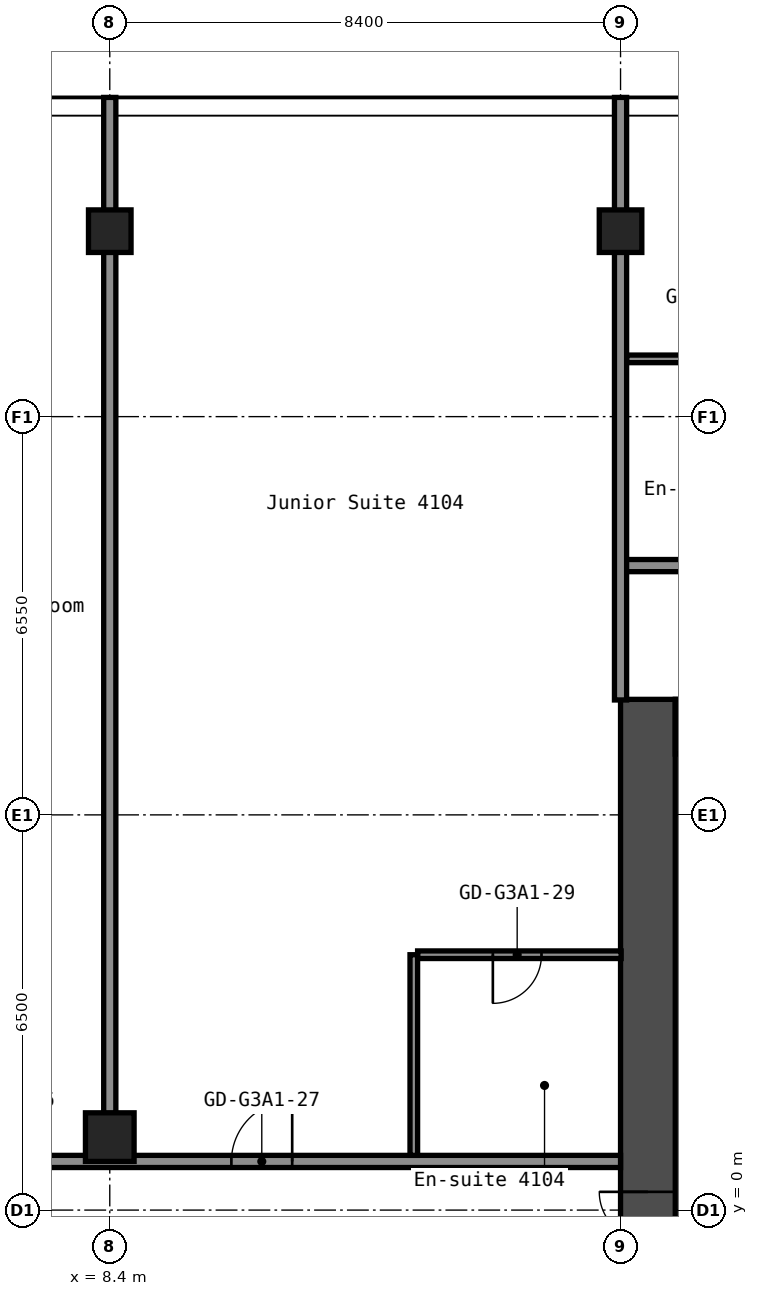
"""IFC4 building model, lengths in metres.
Left out: names, types, materials, properties, quantities, classifications, styles, units other than length and angle.
Written with IfcOpenShell. Run it as: python <this file> out.ifc"""

import sys

from ifc_helpers import new_model, si_unit, direction, frame, frame_2d, origin, origin_2d, place, context, subcontext, project, spatial, rectangle, hollow_rectangle, extrude, element, fill, save


model = new_model("IFC4")
c1 = context("Model", 3, precision=1e-05, world=origin(), true_north=direction((0.0, 1.0)))
c2 = subcontext(c1, "Body", "Model", "MODEL_VIEW")
j1 = project(units=[si_unit("LENGTHUNIT", "METRE"), si_unit("PLANEANGLEUNIT", "RADIAN")], contexts=[c1])
p1 = place(None, origin())
s1 = spatial("IfcSite", under=j1, at=p1, CompositionType="ELEMENT")
p2 = place(p1, origin())
s2 = spatial("IfcBuilding", under=s1, at=p2, CompositionType="ELEMENT")
p3 = place(p2, frame((0.0, 0.0, 147.0)))
s3 = spatial("IfcBuildingStorey", under=s2, at=p3, CompositionType="ELEMENT", Elevation=147.0)
p4 = place(p3, frame((8.4, 1.2, 0.0), z_axis=(0.0, 0.0, 1.0), x_axis=(1.0, 0.0, 0.0)))
e1 = element("IfcColumn", 1, at=p4, inside=s3, PredefinedType="COLUMN", context=c2, shape_type="SweptSolid", body=[
    extrude(hollow_rectangle(XDim=0.8, YDim=0.8, WallThickness=0.032, at=origin_2d()), origin(), (0.0, 0.0, 1.0), 2.75),
])
for number, where, z_axis, x_axis in (
    (2, (8.4, 16.1, 0.0), (0.0, 0.0, 1.0), (1.0, 0.0, 0.0)),
    (3, (16.8, 16.1, 0.0), (0.0, 0.0, 1.0), (1.0, 0.0, 0.0)),
):
    element("IfcColumn", number, at=place(p3, frame(where, z_axis=z_axis, x_axis=x_axis)), inside=s3, PredefinedType="COLUMN", context=c2, shape_type="SweptSolid", body=[
        extrude(hollow_rectangle(XDim=0.7, YDim=0.7, WallThickness=0.028, at=origin_2d()), origin(), (0.0, 0.0, 1.0), 2.75),
    ])
p5 = place(p3, frame((17.25, -8.4, 0.0), z_axis=(0.0, 0.0, 1.0), x_axis=(0.0, 1.0, 0.0)))
e4 = element("IfcWall", 4, at=p5, inside=s3, PredefinedType="SHEAR", context=c2, shape_type="SweptSolid", body=[
    extrude(rectangle(XDim=16.8, YDim=0.9, at=frame_2d((8.4, 0.0))), origin(), (0.0, 0.0, 1.0), 2.75),
])
p6 = place(p5, frame((7.1, 0.0, 0.0)))
e5 = element("IfcOpeningElement", 5, at=p6, cuts=e4, PredefinedType="OPENING", context=c2, shape_type="SweptSolid", body=[
    extrude(rectangle(XDim=1.6, YDim=2.1, at=frame_2d((0.8, 1.05))), frame((0.0, 0.46, 0.0), z_axis=(0.0, -1.0, 0.0), x_axis=(1.0, 0.0, 0.0)), (0.0, 0.0, 1.0), 0.92),
])
p7 = place(p3, frame((17.7, 7.95, 0.0), z_axis=(0.0, 0.0, 1.0), x_axis=(1.0, 0.0, 0.0)))
e6 = element("IfcWall", 6, at=p7, inside=s3, PredefinedType="SHEAR", context=c2, shape_type="SweptSolid", body=[
    extrude(rectangle(XDim=15.0, YDim=0.9, at=frame_2d((7.5, 0.0))), origin(), (0.0, 0.0, 1.0), 2.75),
])
p8 = place(p7, frame((10.4, 0.0, 0.0)))
e7 = element("IfcOpeningElement", 7, at=p8, cuts=e6, PredefinedType="OPENING", context=c2, shape_type="SweptSolid", body=[
    extrude(rectangle(XDim=1.2, YDim=2.1, at=frame_2d((0.6, 1.05))), frame((0.0, 0.46, 0.0), z_axis=(0.0, -1.0, 0.0), x_axis=(1.0, 0.0, 0.0)), (0.0, 0.0, 1.0), 0.92),
])
p9 = place(p7, frame((13.35, 0.0, 0.0)))
e8 = element("IfcOpeningElement", 8, at=p9, cuts=e6, PredefinedType="OPENING", context=c2, shape_type="SweptSolid", body=[
    extrude(rectangle(XDim=0.9, YDim=2.1, at=frame_2d((0.45, 1.05))), frame((0.0, 0.46, 0.0), z_axis=(0.0, -1.0, 0.0), x_axis=(1.0, 0.0, 0.0)), (0.0, 0.0, 1.0), 0.92),
])
p10 = place(p3, frame((-16.8, 0.8, 0.0), z_axis=(0.0, 0.0, 1.0), x_axis=(1.0, 0.0, 0.0)))
e9 = element("IfcWall", 9, at=p10, inside=s3, PredefinedType="PARTITIONING", context=c2, shape_type="SweptSolid", body=[
    extrude(rectangle(XDim=33.6, YDim=0.2, at=frame_2d((16.8, 0.0))), origin(), (0.0, 0.0, 1.0), 2.75),
])
p11 = place(p10, frame((2.0, 0.0, 0.0)))
e10 = element("IfcOpeningElement", 10, at=p11, cuts=e9, PredefinedType="OPENING", context=c2, shape_type="SweptSolid", body=[
    extrude(rectangle(XDim=1.0, YDim=2.1, at=frame_2d((0.5, 1.05))), frame((0.0, 0.11, 0.0), z_axis=(0.0, -1.0, 0.0), x_axis=(1.0, 0.0, 0.0)), (0.0, 0.0, 1.0), 0.22),
])
p12 = place(p10, frame((12.1, 0.0, 0.0)))
e11 = element("IfcOpeningElement", 11, at=p12, cuts=e9, PredefinedType="OPENING", context=c2, shape_type="SweptSolid", body=[
    extrude(rectangle(XDim=1.0, YDim=2.1, at=frame_2d((0.5, 1.05))), frame((0.0, 0.11, 0.0), z_axis=(0.0, -1.0, 0.0), x_axis=(1.0, 0.0, 0.0)), (0.0, 0.0, 1.0), 0.22),
])
p13 = place(p10, frame((18.7, 0.0, 0.0)))
e12 = element("IfcOpeningElement", 12, at=p13, cuts=e9, PredefinedType="OPENING", context=c2, shape_type="SweptSolid", body=[
    extrude(rectangle(XDim=0.9, YDim=2.1, at=frame_2d((0.45, 1.05))), frame((0.0, 0.11, 0.0), z_axis=(0.0, -1.0, 0.0), x_axis=(1.0, 0.0, 0.0)), (0.0, 0.0, 1.0), 0.22),
])
p14 = place(p10, frame((22.9, 0.0, 0.0)))
e13 = element("IfcOpeningElement", 13, at=p14, cuts=e9, PredefinedType="OPENING", context=c2, shape_type="SweptSolid", body=[
    extrude(rectangle(XDim=0.9, YDim=2.1, at=frame_2d((0.45, 1.05))), frame((0.0, 0.11, 0.0), z_axis=(0.0, -1.0, 0.0), x_axis=(1.0, 0.0, 0.0)), (0.0, 0.0, 1.0), 0.22),
])
p15 = place(p10, frame((27.2, 0.0, 0.0)))
e14 = element("IfcOpeningElement", 14, at=p15, cuts=e9, PredefinedType="OPENING", context=c2, shape_type="SweptSolid", body=[
    extrude(rectangle(XDim=1.0, YDim=2.1, at=frame_2d((0.5, 1.05))), frame((0.0, 0.11, 0.0), z_axis=(0.0, -1.0, 0.0), x_axis=(1.0, 0.0, 0.0)), (0.0, 0.0, 1.0), 0.22),
])
p16 = place(p3, frame((13.462, 4.2, 0.0), z_axis=(0.0, 0.0, 1.0), x_axis=(1.0, 0.0, 0.0)))
e15 = element("IfcWall", 15, at=p16, inside=s3, PredefinedType="PARTITIONING", context=c2, shape_type="SweptSolid", body=[
    extrude(rectangle(XDim=3.348, YDim=0.125, at=frame_2d((1.674, 0.0))), origin(), (0.0, 0.0, 1.0), 2.75),
])
p17 = place(p16, frame((1.238, 0.0, 0.0)))
e16 = element("IfcOpeningElement", 16, at=p17, cuts=e15, PredefinedType="OPENING", context=c2, shape_type="SweptSolid", body=[
    extrude(rectangle(XDim=0.8, YDim=2.1, at=frame_2d((0.4, 1.05))), frame((0.0, 0.073, 0.0), z_axis=(0.0, -1.0, 0.0), x_axis=(1.0, 0.0, 0.0)), (0.0, 0.0, 1.0), 0.145),
])
p18 = place(p3, frame((16.8, 10.6, 0.0), z_axis=(0.0, 0.0, 1.0), x_axis=(1.0, 0.0, 0.0)))
e17 = element("IfcWall", 17, at=p18, inside=s3, PredefinedType="PARTITIONING", context=c2, shape_type="SweptSolid", body=[
    extrude(rectangle(XDim=25.9, YDim=0.2, at=frame_2d((12.95, 0.0))), origin(), (0.0, 0.0, 1.0), 2.75),
])
p19 = place(p18, frame((5.4, 0.0, 0.0)))
e18 = element("IfcOpeningElement", 18, at=p19, cuts=e17, PredefinedType="OPENING", context=c2, shape_type="SweptSolid", body=[
    extrude(rectangle(XDim=1.0, YDim=2.1, at=frame_2d((0.5, 1.05))), frame((0.0, 0.11, 0.0), z_axis=(0.0, -1.0, 0.0), x_axis=(1.0, 0.0, 0.0)), (0.0, 0.0, 1.0), 0.22),
])
p20 = place(p18, frame((13.8, 0.0, 0.0)))
e19 = element("IfcOpeningElement", 19, at=p20, cuts=e17, PredefinedType="OPENING", context=c2, shape_type="SweptSolid", body=[
    extrude(rectangle(XDim=1.0, YDim=2.1, at=frame_2d((0.5, 1.05))), frame((0.0, 0.11, 0.0), z_axis=(0.0, -1.0, 0.0), x_axis=(1.0, 0.0, 0.0)), (0.0, 0.0, 1.0), 0.22),
])
p21 = place(p18, frame((19.0, 0.0, 0.0)))
e20 = element("IfcOpeningElement", 20, at=p21, cuts=e17, PredefinedType="OPENING", context=c2, shape_type="SweptSolid", body=[
    extrude(rectangle(XDim=1.0, YDim=2.1, at=frame_2d((0.5, 1.05))), frame((0.0, 0.11, 0.0), z_axis=(0.0, -1.0, 0.0), x_axis=(1.0, 0.0, 0.0)), (0.0, 0.0, 1.0), 0.22),
])
p22 = place(p3, frame((16.9, 14.0, 0.0), z_axis=(0.0, 0.0, 1.0), x_axis=(1.0, 0.0, 0.0)))
e21 = element("IfcWall", 21, at=p22, inside=s3, PredefinedType="PARTITIONING", context=c2, shape_type="SweptSolid", body=[
    extrude(rectangle(XDim=3.238, YDim=0.125, at=frame_2d((1.619, 0.0))), origin(), (0.0, 0.0, 1.0), 2.75),
])
p23 = place(p22, frame((1.2, 0.0, 0.0)))
e22 = element("IfcOpeningElement", 22, at=p23, cuts=e21, PredefinedType="OPENING", context=c2, shape_type="SweptSolid", body=[
    extrude(rectangle(XDim=0.8, YDim=2.1, at=frame_2d((0.4, 1.05))), frame((0.0, 0.073, 0.0), z_axis=(0.0, -1.0, 0.0), x_axis=(1.0, 0.0, 0.0)), (0.0, 0.0, 1.0), 0.145),
])
p24 = place(p3, frame((8.4, 1.59, 0.0), z_axis=(0.0, 0.0, 1.0), x_axis=(0.0, 1.0, 0.0)))
e23 = element("IfcWall", 23, at=p24, inside=s3, PredefinedType="PARTITIONING", context=c2, shape_type="SweptSolid", body=[
    extrude(rectangle(XDim=16.71, YDim=0.2, at=frame_2d((8.355, 0.0))), origin(), (0.0, 0.0, 1.0), 2.75),
])
p25 = place(p3, frame((13.4, 0.9, 0.0), z_axis=(0.0, 0.0, 1.0), x_axis=(0.0, 1.0, 0.0)))
e24 = element("IfcWall", 24, at=p25, inside=s3, PredefinedType="PARTITIONING", context=c2, shape_type="SweptSolid", body=[
    extrude(rectangle(XDim=3.3, YDim=0.125, at=frame_2d((1.65, 0.0))), origin(), (0.0, 0.0, 1.0), 2.75),
])
p26 = place(p3, frame((16.8, 8.39, 0.0), z_axis=(0.0, 0.0, 1.0), x_axis=(0.0, 1.0, 0.0)))
e25 = element("IfcWall", 25, at=p26, inside=s3, PredefinedType="PARTITIONING", context=c2, shape_type="SweptSolid", body=[
    extrude(rectangle(XDim=9.91, YDim=0.2, at=frame_2d((4.955, 0.0))), origin(), (0.0, 0.0, 1.0), 2.75),
])
p27 = place(p6, origin())
e26 = element("IfcDoor", 26, at=p27, inside=s3, OperationType="DOUBLE_DOOR_SINGLE_SWING", PredefinedType="DOOR", context=c2, shape_type="SweptSolid", body=[
    extrude(rectangle(XDim=1.6, YDim=2.1, at=frame_2d((0.8, 1.05))), frame((0.0, 0.025, 0.0), z_axis=(0.0, -1.0, 0.0), x_axis=(1.0, 0.0, 0.0)), (0.0, 0.0, 1.0), 0.05),
])
fill(e5, e26)
p28 = place(p15, origin())
e27 = element("IfcDoor", 27, at=p28, inside=s3, OperationType="SINGLE_SWING_LEFT", PredefinedType="DOOR", context=c2, shape_type="SweptSolid", body=[
    extrude(rectangle(XDim=1.0, YDim=2.1, at=frame_2d((0.5, 1.05))), frame((0.0, 0.025, 0.0), z_axis=(0.0, -1.0, 0.0), x_axis=(1.0, 0.0, 0.0)), (0.0, 0.0, 1.0), 0.05),
])
fill(e14, e27)
p29 = place(p17, origin())
e28 = element("IfcDoor", 28, at=p29, inside=s3, OperationType="SINGLE_SWING_LEFT", PredefinedType="DOOR", context=c2, shape_type="SweptSolid", body=[
    extrude(rectangle(XDim=0.8, YDim=2.1, at=frame_2d((0.4, 1.05))), frame((0.0, 0.025, 0.0), z_axis=(0.0, -1.0, 0.0), x_axis=(1.0, 0.0, 0.0)), (0.0, 0.0, 1.0), 0.05),
])
fill(e16, e28)
save(model, sys.argv[1])
